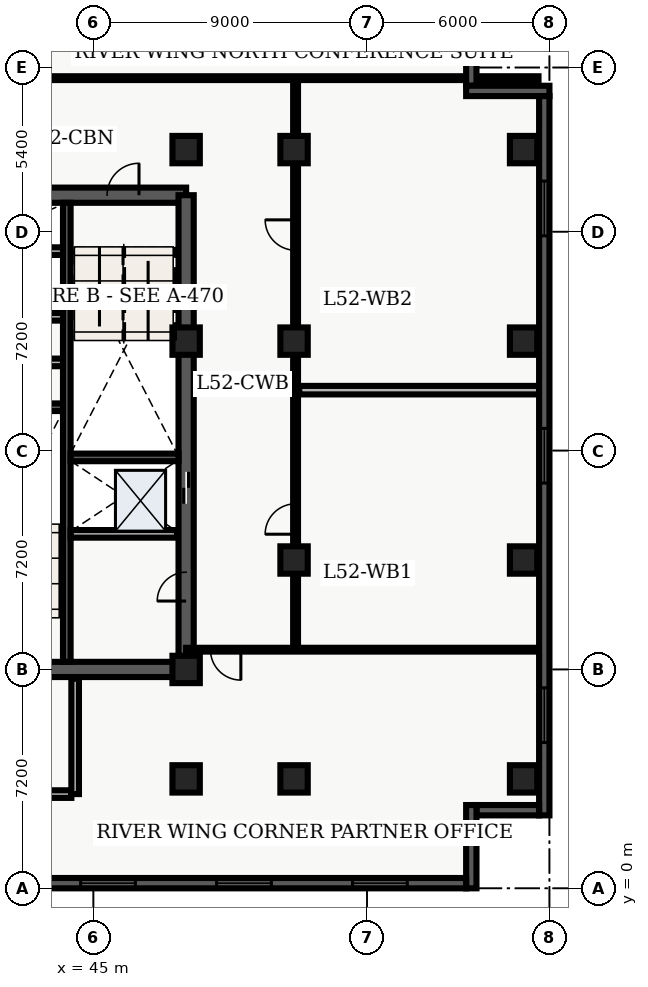
"""IFC4 building model, lengths in metres.
Left out: names, types, materials, properties, quantities, classifications, styles, units other than length and angle.
Written with IfcOpenShell. Run it as: python <this file> out.ifc"""

import sys

from ifc_helpers import new_model, entity, si_unit, converted_unit, direction, frame, origin_with_axes, origin_2d_with_axis, place, context, subcontext, project, spatial, polyline, rectangle, outline, extrude, element, fill, save


model = new_model("IFC4")
c1 = context("Model", 3, precision=1e-05, world=origin_with_axes(), true_north=direction((0.0, 1.0)))
c2 = subcontext(c1, "Body", "Model", "MODEL_VIEW")
j1 = project(units=[si_unit("LENGTHUNIT", "METRE"), converted_unit("PLANEANGLEUNIT", "DEGREE", entity("IfcPlaneAngleMeasure", 0.017), si_unit("PLANEANGLEUNIT", "RADIAN"), dimensions=[0, 0, 0, 0, 0, 0, 0])], contexts=[c1])
p1 = place(None, origin_with_axes())
s1 = spatial("IfcSite", under=j1, at=p1, CompositionType="ELEMENT")
p2 = place(p1, origin_with_axes())
s2 = spatial("IfcBuilding", under=s1, at=p2, CompositionType="ELEMENT")
p3 = place(p2, frame((0.0, 0.0, 212.1), z_axis=(0.0, 0.0, 1.0), x_axis=(1.0, 0.0, 0.0)))
s3 = spatial("IfcBuildingStorey", under=s2, at=p3, CompositionType="ELEMENT", Elevation=212.1)
p4 = place(p3, frame((40.2, 7.2, 0.0), z_axis=(0.0, 0.0, 1.0), x_axis=(1.0, 0.0, 0.0)))
e1 = element("IfcWall", 1, at=p4, inside=s3, PredefinedType="SHEAR", context=c2, shape_type="SweptSolid", body=[
    extrude(outline(polyline([(0.0, -0.25), (7.85, -0.25), (7.85, 0.25), (0.0, 0.25), (0.0, -0.25)])), origin_with_axes(), (0.0, 0.0, 1.0), 3.66),
])
p5 = place(p4, frame((2.175, 0.0, 0.0), z_axis=(0.0, 0.0, 1.0), x_axis=(1.0, 0.0, 0.0)))
e2 = element("IfcOpeningElement", 2, at=p5, cuts=e1, PredefinedType="OPENING", context=c2, shape_type="SweptSolid", body=[
    extrude(rectangle(XDim=1.05, YDim=0.52, at=origin_2d_with_axis()), origin_with_axes(), (0.0, 0.0, 1.0), 2.15),
])
p6 = place(p3, frame((40.2, 22.8, 0.0), z_axis=(0.0, 0.0, 1.0), x_axis=(1.0, 0.0, 0.0)))
e3 = element("IfcWall", 3, at=p6, inside=s3, PredefinedType="SHEAR", context=c2, shape_type="SweptSolid", body=[
    extrude(outline(polyline([(0.0, -0.25), (7.85, -0.25), (7.85, 0.25), (0.0, 0.25), (0.0, -0.25)])), origin_with_axes(), (0.0, 0.0, 1.0), 3.66),
])
p7 = place(p6, frame((5.775, 0.0, 0.0), z_axis=(0.0, 0.0, 1.0), x_axis=(1.0, 0.0, 0.0)))
e4 = element("IfcOpeningElement", 4, at=p7, cuts=e3, PredefinedType="OPENING", context=c2, shape_type="SweptSolid", body=[
    extrude(rectangle(XDim=1.05, YDim=0.52, at=origin_2d_with_axis()), origin_with_axes(), (0.0, 0.0, 1.0), 2.15),
])
p8 = place(p3, frame((48.05, 7.2, 0.0), z_axis=(0.0, 0.0, 1.0), x_axis=(0.0, 1.0, 0.0)))
e5 = element("IfcWall", 5, at=p8, inside=s3, PredefinedType="SHEAR", context=c2, shape_type="SweptSolid", body=[
    extrude(outline(polyline([(0.0, -0.25), (15.6, -0.25), (15.6, 0.25), (0.0, 0.25), (0.0, -0.25)])), origin_with_axes(), (0.0, 0.0, 1.0), 3.66),
])
p9 = place(p8, frame((5.975, 0.0, 0.0), z_axis=(0.0, 0.0, 1.0), x_axis=(1.0, 0.0, 0.0)))
e6 = element("IfcOpeningElement", 6, at=p9, cuts=e5, PredefinedType="OPENING", context=c2, shape_type="SweptSolid", body=[
    extrude(rectangle(XDim=1.05, YDim=0.52, at=origin_2d_with_axis()), origin_with_axes(), (0.0, 0.0, 1.0), 2.15),
])
p10 = place(p8, frame((2.725, 0.0, 0.0), z_axis=(0.0, 0.0, 1.0), x_axis=(1.0, 0.0, 0.0)))
e7 = element("IfcOpeningElement", 7, at=p10, cuts=e5, PredefinedType="OPENING", context=c2, shape_type="SweptSolid", body=[
    extrude(rectangle(XDim=0.95, YDim=0.52, at=origin_2d_with_axis()), origin_with_axes(), (0.0, 0.0, 1.0), 2.15),
])
p11 = place(p3, frame((44.125, 7.45, 0.0), z_axis=(0.0, 0.0, 1.0), x_axis=(0.0, 1.0, 0.0)))
e8 = element("IfcWall", 8, at=p11, inside=s3, PredefinedType="SHEAR", context=c2, shape_type="SweptSolid", body=[
    extrude(outline(polyline([(0.0, -0.125), (15.1, -0.125), (15.1, 0.125), (0.0, 0.125), (0.0, -0.125)])), origin_with_axes(), (0.0, 0.0, 1.0), 3.66),
])
for number, where, z_axis, x_axis in (
    (9, (40.45, 15.825, 0.0), (0.0, 0.0, 1.0), (1.0, 0.0, 0.0)),
    (10, (44.25, 14.175, 0.0), (0.0, 0.0, 1.0), (1.0, 0.0, 0.0)),
):
    element("IfcWall", number, at=place(p3, frame(where, z_axis=z_axis, x_axis=x_axis)), inside=s3, PredefinedType="SHEAR", context=c2, shape_type="SweptSolid", body=[
        extrude(outline(polyline([(0.0, -0.125), (3.55, -0.125), (3.55, 0.125), (0.0, 0.125), (0.0, -0.125)])), origin_with_axes(), (0.0, 0.0, 1.0), 3.66),
    ])
p12 = place(p3, frame((40.5, 17.3, 0.0), z_axis=(0.0, 0.0, 1.0), x_axis=(1.0, 0.0, 0.0)))
e11 = element("IfcWall", 11, at=p12, inside=s3, PredefinedType="SOLIDWALL", context=c2, shape_type="SweptSolid", body=[
    extrude(outline(polyline([(0.0, -0.125), (3.5, -0.125), (3.5, 0.125), (0.0, 0.125), (0.0, -0.125)])), origin_with_axes(), (0.0, 0.0, 1.0), 2.7),
])
p13 = place(p12, frame((2.4, 0.0, 0.0), z_axis=(0.0, 0.0, 1.0), x_axis=(1.0, 0.0, 0.0)))
e12 = element("IfcOpeningElement", 12, at=p13, cuts=e11, PredefinedType="OPENING", context=c2, shape_type="SweptSolid", body=[
    extrude(rectangle(XDim=0.9, YDim=0.27, at=origin_2d_with_axis()), origin_with_axes(), (0.0, 0.0, 1.0), 2.15),
])
p14 = place(p3, frame((40.5, 18.8, 0.0), z_axis=(0.0, 0.0, 1.0), x_axis=(1.0, 0.0, 0.0)))
e13 = element("IfcWall", 13, at=p14, inside=s3, PredefinedType="SOLIDWALL", context=c2, shape_type="SweptSolid", body=[
    extrude(outline(polyline([(0.0, -0.125), (3.5, -0.125), (3.5, 0.125), (0.0, 0.125), (0.0, -0.125)])), origin_with_axes(), (0.0, 0.0, 1.0), 2.7),
])
p15 = place(p3, frame((40.325, 3.1, 0.0), z_axis=(0.0, 0.0, 1.0), x_axis=(1.0, 0.0, 0.0)))
e14 = element("IfcWall", 14, at=p15, inside=s3, PredefinedType="SOLIDWALL", context=c2, shape_type="SweptSolid", body=[
    extrude(outline(polyline([(0.0, -0.125), (3.95, -0.125), (3.95, 0.125), (0.0, 0.125), (0.0, -0.125)])), origin_with_axes(), (0.0, 0.0, 1.0), 2.7),
])
p16 = place(p3, frame((44.4, 3.1, 0.0), z_axis=(0.0, 0.0, 1.0), x_axis=(0.0, 1.0, 0.0)))
e15 = element("IfcWall", 15, at=p16, inside=s3, PredefinedType="SOLIDWALL", context=c2, shape_type="SweptSolid", body=[
    extrude(outline(polyline([(0.0, -0.125), (3.8, -0.125), (3.8, 0.125), (0.0, 0.125), (0.0, -0.125)])), origin_with_axes(), (0.0, 0.0, 1.0), 2.7),
])
for number, where, z_axis, x_axis in (
    (16, (48.05, 3.6, 0.0), (0.0, 0.0, 1.0), (1.0, 0.0, 0.0)),
    (17, (48.05, 7.2, 0.0), (0.0, 0.0, 1.0), (1.0, 0.0, 0.0)),
    (18, (48.05, 18.0, 0.0), (0.0, 0.0, 1.0), (1.0, 0.0, 0.0)),
    (19, (48.05, 24.3, 0.0), (0.0, 0.0, 1.0), (1.0, 0.0, 0.0)),
    (20, (51.6, 3.6, 0.0), (0.0, 0.0, 1.0), (1.0, 0.0, 0.0)),
    (21, (51.6, 10.8, 0.0), (0.0, 0.0, 1.0), (1.0, 0.0, 0.0)),
    (22, (51.6, 18.0, 0.0), (0.0, 0.0, 1.0), (1.0, 0.0, 0.0)),
    (23, (51.6, 24.3, 0.0), (0.0, 0.0, 1.0), (1.0, 0.0, 0.0)),
    (24, (59.15, 3.6, 0.0), (0.0, 0.0, 1.0), (1.0, 0.0, 0.0)),
    (25, (59.15, 10.8, 0.0), (0.0, 0.0, 1.0), (1.0, 0.0, 0.0)),
    (26, (59.15, 18.0, 0.0), (0.0, 0.0, 1.0), (1.0, 0.0, 0.0)),
    (27, (59.15, 24.3, 0.0), (0.0, 0.0, 1.0), (1.0, 0.0, 0.0)),
):
    element("IfcColumn", number, at=place(p3, frame(where, z_axis=z_axis, x_axis=x_axis)), inside=s3, PredefinedType="COLUMN", context=c2, shape_type="SweptSolid", body=[
        extrude(rectangle(XDim=0.9, YDim=0.9, at=origin_2d_with_axis()), origin_with_axes(), (0.0, 0.0, 1.0), 3.9),
    ])
for number, where, z_axis, x_axis in (
    (28, (40.5, 20.96, 0.0), (0.0, 0.0, 1.0), (1.0, 0.0, 0.0)),
    (29, (44.25, 11.66, 0.0), (0.0, 0.0, 1.0), (1.0, 0.0, 0.0)),
):
    element("IfcWall", number, at=place(p3, frame(where, z_axis=z_axis, x_axis=x_axis)), inside=s3, PredefinedType="SOLIDWALL", context=c2, shape_type="SweptSolid", body=[
        extrude(outline(polyline([(0.0, -0.125), (3.5, -0.125), (3.5, 0.125), (0.0, 0.125), (0.0, -0.125)])), origin_with_axes(), (0.0, 0.0, 1.0), 2.7),
    ])
p17 = place(p3, frame((51.65, 7.85, 0.0), z_axis=(0.0, 0.0, 1.0), x_axis=(0.0, 1.0, 0.0)))
e30 = element("IfcWall", 30, at=p17, inside=s3, PredefinedType="PARTITIONING", context=c2, shape_type="SweptSolid", body=[
    extrude(outline(polyline([(0.0, -0.08), (18.8, -0.08), (18.8, 0.08), (0.0, 0.08), (0.0, -0.08)])), origin_with_axes(), (0.0, 0.0, 1.0), 2.7),
])
p18 = place(p17, frame((4.298, 0.0, 0.0), z_axis=(0.0, 0.0, 1.0), x_axis=(1.0, 0.0, 0.0)))
e31 = element("IfcOpeningElement", 31, at=p18, cuts=e30, PredefinedType="OPENING", context=c2, shape_type="SweptSolid", body=[
    extrude(rectangle(XDim=1.0, YDim=0.18, at=origin_2d_with_axis()), origin_with_axes(), (0.0, 0.0, 1.0), 2.15),
])
p19 = place(p17, frame((13.639, 0.0, 0.0), z_axis=(0.0, 0.0, 1.0), x_axis=(1.0, 0.0, 0.0)))
e32 = element("IfcOpeningElement", 32, at=p19, cuts=e30, PredefinedType="OPENING", context=c2, shape_type="SweptSolid", body=[
    extrude(rectangle(XDim=1.0, YDim=0.18, at=origin_2d_with_axis()), origin_with_axes(), (0.0, 0.0, 1.0), 2.15),
])
p20 = place(p3, frame((59.665, 7.85, 0.0), z_axis=(0.0, 0.0, 1.0), x_axis=(-1.0, 0.0, 0.0)))
e33 = element("IfcWall", 33, at=p20, inside=s3, PredefinedType="PARTITIONING", context=c2, shape_type="SweptSolid", body=[
    extrude(outline(polyline([(0.0, -0.062), (11.615, -0.062), (11.615, 0.062), (0.0, 0.062), (0.0, -0.062)])), origin_with_axes(), (0.0, 0.0, 1.0), 2.7),
])
p21 = place(p20, frame((10.315, 0.0, 0.0), z_axis=(0.0, 0.0, 1.0), x_axis=(1.0, 0.0, 0.0)))
e34 = element("IfcOpeningElement", 34, at=p21, cuts=e33, PredefinedType="OPENING", context=c2, shape_type="SweptSolid", body=[
    extrude(rectangle(XDim=1.0, YDim=0.145, at=origin_2d_with_axis()), origin_with_axes(), (0.0, 0.0, 1.0), 2.15),
])
p22 = place(p3, frame((38.735, 26.65, 0.0), z_axis=(0.0, 0.0, 1.0), x_axis=(1.0, 0.0, 0.0)))
e35 = element("IfcWall", 35, at=p22, inside=s3, PredefinedType="PARTITIONING", context=c2, shape_type="SweptSolid", body=[
    extrude(outline(polyline([(0.0, -0.062), (20.905, -0.062), (20.905, 0.062), (0.0, 0.062), (0.0, -0.062)])), origin_with_axes(), (0.0, 0.0, 1.0), 2.7),
])
p23 = place(p22, frame((4.265, 0.0, 0.0), z_axis=(0.0, 0.0, 1.0), x_axis=(1.0, 0.0, 0.0)))
e36 = element("IfcOpeningElement", 36, at=p23, cuts=e35, PredefinedType="OPENING", context=c2, shape_type="SweptSolid", body=[
    extrude(rectangle(XDim=1.0, YDim=0.145, at=origin_2d_with_axis()), origin_with_axes(), (0.0, 0.0, 1.0), 2.15),
])
p24 = place(p3, frame((51.77, 16.387, 0.0), z_axis=(0.0, 0.0, 1.0), x_axis=(1.0, 0.0, 0.0)))
e37 = element("IfcWall", 37, at=p24, inside=s3, PredefinedType="PARTITIONING", context=c2, shape_type="SweptSolid", body=[
    extrude(outline(polyline([(0.0, -0.14), (7.895, -0.14), (7.895, 0.14), (0.0, 0.14), (0.0, -0.14)])), origin_with_axes(), (0.0, 0.0, 1.0), 2.7),
])
p25 = place(p3, frame((57.43, 28.46, 0.0), z_axis=(0.0, 0.0, 1.0), x_axis=(0.0, -1.0, 0.0)))
e38 = element("IfcWall", 38, at=p25, inside=s3, PredefinedType="SOLIDWALL", context=c2, shape_type="SweptSolid", body=[
    extrude(outline(polyline([(0.0, -0.17), (2.06, -0.17), (2.06, 0.17), (0.0, 0.17), (0.0, -0.17)])), origin_with_axes(), (0.0, 0.0, 1.0), 3.66),
])
p26 = place(p3, frame((57.26, 26.23, 0.0), z_axis=(0.0, 0.0, 1.0), x_axis=(1.0, 0.0, 0.0)))
e39 = element("IfcWall", 39, at=p26, inside=s3, PredefinedType="SOLIDWALL", context=c2, shape_type="SweptSolid", body=[
    extrude(outline(polyline([(0.0, -0.17), (2.74, -0.17), (2.74, 0.17), (0.0, 0.17), (0.0, -0.17)])), origin_with_axes(), (0.0, 0.0, 1.0), 3.66),
])
p27 = place(p3, frame((59.83, 26.06, 0.0), z_axis=(0.0, 0.0, 1.0), x_axis=(0.0, -1.0, 0.0)))
e40 = element("IfcWall", 40, at=p27, inside=s3, PredefinedType="SOLIDWALL", context=c2, shape_type="SweptSolid", body=[
    extrude(outline(polyline([(0.0, -0.17), (23.66, -0.17), (23.66, 0.17), (0.0, 0.17), (0.0, -0.17)])), origin_with_axes(), (0.0, 0.0, 1.0), 3.66),
])
p28 = place(p27, frame((3.696, 0.0, 0.45), z_axis=(0.0, 0.0, 1.0), x_axis=(1.0, 0.0, 0.0)))
e41 = element("IfcOpeningElement", 41, at=p28, cuts=e40, PredefinedType="OPENING", context=c2, shape_type="SweptSolid", body=[
    extrude(rectangle(XDim=1.8, YDim=0.36, at=origin_2d_with_axis()), origin_with_axes(), (0.0, 0.0, 1.0), 2.1),
])
p29 = place(p27, frame((11.83, 0.0, 0.45), z_axis=(0.0, 0.0, 1.0), x_axis=(1.0, 0.0, 0.0)))
e42 = element("IfcOpeningElement", 42, at=p29, cuts=e40, PredefinedType="OPENING", context=c2, shape_type="SweptSolid", body=[
    extrude(rectangle(XDim=1.8, YDim=0.36, at=origin_2d_with_axis()), origin_with_axes(), (0.0, 0.0, 1.0), 2.1),
])
p30 = place(p27, frame((20.364, 0.0, 0.45), z_axis=(0.0, 0.0, 1.0), x_axis=(1.0, 0.0, 0.0)))
e43 = element("IfcOpeningElement", 43, at=p30, cuts=e40, PredefinedType="OPENING", context=c2, shape_type="SweptSolid", body=[
    extrude(rectangle(XDim=1.8, YDim=0.36, at=origin_2d_with_axis()), origin_with_axes(), (0.0, 0.0, 1.0), 2.1),
])
p31 = place(p3, frame((59.66, 2.57, 0.0), z_axis=(0.0, 0.0, 1.0), x_axis=(-1.0, 0.0, 0.0)))
e44 = element("IfcWall", 44, at=p31, inside=s3, PredefinedType="SOLIDWALL", context=c2, shape_type="SweptSolid", body=[
    extrude(outline(polyline([(0.0, -0.17), (2.06, -0.17), (2.06, 0.17), (0.0, 0.17), (0.0, -0.17)])), origin_with_axes(), (0.0, 0.0, 1.0), 3.66),
])
p32 = place(p3, frame((57.43, 2.74, 0.0), z_axis=(0.0, 0.0, 1.0), x_axis=(0.0, -1.0, 0.0)))
e45 = element("IfcWall", 45, at=p32, inside=s3, PredefinedType="SOLIDWALL", context=c2, shape_type="SweptSolid", body=[
    extrude(outline(polyline([(0.0, -0.17), (2.74, -0.17), (2.74, 0.17), (0.0, 0.17), (0.0, -0.17)])), origin_with_axes(), (0.0, 0.0, 1.0), 3.66),
])
p33 = place(p3, frame((57.26, 0.17, 0.0), z_axis=(0.0, 0.0, 1.0), x_axis=(-1.0, 0.0, 0.0)))
e46 = element("IfcWall", 46, at=p33, inside=s3, PredefinedType="SOLIDWALL", context=c2, shape_type="SweptSolid", body=[
    extrude(outline(polyline([(0.0, -0.17), (54.86, -0.17), (54.86, 0.17), (0.0, 0.17), (0.0, -0.17)])), origin_with_axes(), (0.0, 0.0, 1.0), 3.66),
])
p34 = place(p33, frame((2.836, 0.0, 0.45), z_axis=(0.0, 0.0, 1.0), x_axis=(1.0, 0.0, 0.0)))
e47 = element("IfcOpeningElement", 47, at=p34, cuts=e46, PredefinedType="OPENING", context=c2, shape_type="SweptSolid", body=[
    extrude(rectangle(XDim=1.8, YDim=0.36, at=origin_2d_with_axis()), origin_with_axes(), (0.0, 0.0, 1.0), 2.1),
])
p35 = place(p33, frame((7.307, 0.0, 0.45), z_axis=(0.0, 0.0, 1.0), x_axis=(1.0, 0.0, 0.0)))
e48 = element("IfcOpeningElement", 48, at=p35, cuts=e46, PredefinedType="OPENING", context=c2, shape_type="SweptSolid", body=[
    extrude(rectangle(XDim=1.8, YDim=0.36, at=origin_2d_with_axis()), origin_with_axes(), (0.0, 0.0, 1.0), 2.1),
])
p36 = place(p33, frame((11.779, 0.0, 0.45), z_axis=(0.0, 0.0, 1.0), x_axis=(1.0, 0.0, 0.0)))
e49 = element("IfcOpeningElement", 49, at=p36, cuts=e46, PredefinedType="OPENING", context=c2, shape_type="SweptSolid", body=[
    extrude(rectangle(XDim=1.8, YDim=0.36, at=origin_2d_with_axis()), origin_with_axes(), (0.0, 0.0, 1.0), 2.1),
])
p37 = place(p33, frame((16.251, 0.0, 0.45), z_axis=(0.0, 0.0, 1.0), x_axis=(1.0, 0.0, 0.0)))
e50 = element("IfcOpeningElement", 50, at=p37, cuts=e46, PredefinedType="OPENING", context=c2, shape_type="SweptSolid", body=[
    extrude(rectangle(XDim=1.8, YDim=0.36, at=origin_2d_with_axis()), origin_with_axes(), (0.0, 0.0, 1.0), 2.1),
])
p38 = place(p33, frame((20.723, 0.0, 0.45), z_axis=(0.0, 0.0, 1.0), x_axis=(1.0, 0.0, 0.0)))
e51 = element("IfcOpeningElement", 51, at=p38, cuts=e46, PredefinedType="OPENING", context=c2, shape_type="SweptSolid", body=[
    extrude(rectangle(XDim=1.8, YDim=0.36, at=origin_2d_with_axis()), origin_with_axes(), (0.0, 0.0, 1.0), 2.1),
])
p39 = place(p33, frame((25.194, 0.0, 0.45), z_axis=(0.0, 0.0, 1.0), x_axis=(1.0, 0.0, 0.0)))
e52 = element("IfcOpeningElement", 52, at=p39, cuts=e46, PredefinedType="OPENING", context=c2, shape_type="SweptSolid", body=[
    extrude(rectangle(XDim=1.8, YDim=0.36, at=origin_2d_with_axis()), origin_with_axes(), (0.0, 0.0, 1.0), 2.1),
])
p40 = place(p33, frame((29.666, 0.0, 0.45), z_axis=(0.0, 0.0, 1.0), x_axis=(1.0, 0.0, 0.0)))
e53 = element("IfcOpeningElement", 53, at=p40, cuts=e46, PredefinedType="OPENING", context=c2, shape_type="SweptSolid", body=[
    extrude(rectangle(XDim=1.8, YDim=0.36, at=origin_2d_with_axis()), origin_with_axes(), (0.0, 0.0, 1.0), 2.1),
])
p41 = place(p33, frame((34.138, 0.0, 0.45), z_axis=(0.0, 0.0, 1.0), x_axis=(1.0, 0.0, 0.0)))
e54 = element("IfcOpeningElement", 54, at=p41, cuts=e46, PredefinedType="OPENING", context=c2, shape_type="SweptSolid", body=[
    extrude(rectangle(XDim=1.8, YDim=0.36, at=origin_2d_with_axis()), origin_with_axes(), (0.0, 0.0, 1.0), 2.1),
])
p42 = place(p33, frame((38.609, 0.0, 0.45), z_axis=(0.0, 0.0, 1.0), x_axis=(1.0, 0.0, 0.0)))
e55 = element("IfcOpeningElement", 55, at=p42, cuts=e46, PredefinedType="OPENING", context=c2, shape_type="SweptSolid", body=[
    extrude(rectangle(XDim=1.8, YDim=0.36, at=origin_2d_with_axis()), origin_with_axes(), (0.0, 0.0, 1.0), 2.1),
])
p43 = place(p33, frame((43.531, 0.0, 0.45), z_axis=(0.0, 0.0, 1.0), x_axis=(1.0, 0.0, 0.0)))
e56 = element("IfcOpeningElement", 56, at=p43, cuts=e46, PredefinedType="OPENING", context=c2, shape_type="SweptSolid", body=[
    extrude(rectangle(XDim=1.8, YDim=0.36, at=origin_2d_with_axis()), origin_with_axes(), (0.0, 0.0, 1.0), 2.1),
])
p44 = place(p33, frame((47.553, 0.0, 0.45), z_axis=(0.0, 0.0, 1.0), x_axis=(1.0, 0.0, 0.0)))
e57 = element("IfcOpeningElement", 57, at=p44, cuts=e46, PredefinedType="OPENING", context=c2, shape_type="SweptSolid", body=[
    extrude(rectangle(XDim=1.8, YDim=0.36, at=origin_2d_with_axis()), origin_with_axes(), (0.0, 0.0, 1.0), 2.1),
])
p45 = place(p33, frame((52.474, 0.0, 0.45), z_axis=(0.0, 0.0, 1.0), x_axis=(1.0, 0.0, 0.0)))
e58 = element("IfcOpeningElement", 58, at=p45, cuts=e46, PredefinedType="OPENING", context=c2, shape_type="SweptSolid", body=[
    extrude(rectangle(XDim=1.8, YDim=0.36, at=origin_2d_with_axis()), origin_with_axes(), (0.0, 0.0, 1.0), 2.1),
])
p46 = place(p8, frame((5.975, 0.0, 0.0), z_axis=(0.0, 0.0, 1.0), x_axis=(1.0, 0.0, 0.0)))
e59 = element("IfcDoor", 59, at=p46, inside=s3, OperationType="SLIDING_TO_LEFT", PredefinedType="DOOR", context=c2, shape_type="SweptSolid", body=[
    extrude(rectangle(XDim=1.05, YDim=0.09, at=origin_2d_with_axis()), origin_with_axes(), (0.0, 0.0, 1.0), 2.15),
])
fill(e6, e59)
p47 = place(p6, frame((5.775, 0.0, 0.0), z_axis=(0.0, 0.0, 1.0), x_axis=(1.0, 0.0, 0.0)))
e60 = element("IfcDoor", 60, at=p47, inside=s3, OperationType="SINGLE_SWING_RIGHT", PredefinedType="DOOR", context=c2, shape_type="SweptSolid", body=[
    extrude(rectangle(XDim=1.05, YDim=0.09, at=origin_2d_with_axis()), origin_with_axes(), (0.0, 0.0, 1.0), 2.15),
])
fill(e4, e60)
p48 = place(p8, frame((2.725, 0.0, 0.0), z_axis=(0.0, 0.0, 1.0), x_axis=(1.0, 0.0, 0.0)))
e61 = element("IfcDoor", 61, at=p48, inside=s3, OperationType="SINGLE_SWING_LEFT", PredefinedType="DOOR", context=c2, shape_type="SweptSolid", body=[
    extrude(rectangle(XDim=0.95, YDim=0.09, at=origin_2d_with_axis()), origin_with_axes(), (0.0, 0.0, 1.0), 2.15),
])
fill(e7, e61)
p49 = place(p20, frame((10.315, 0.0, 0.0), z_axis=(0.0, 0.0, 1.0), x_axis=(1.0, 0.0, 0.0)))
e62 = element("IfcDoor", 62, at=p49, inside=s3, OperationType="SINGLE_SWING_LEFT", PredefinedType="DOOR", context=c2, shape_type="SweptSolid", body=[
    extrude(rectangle(XDim=1.0, YDim=0.075, at=origin_2d_with_axis()), origin_with_axes(), (0.0, 0.0, 1.0), 2.15),
])
fill(e34, e62)
p50 = place(p17, frame((4.298, 0.0, 0.0), z_axis=(0.0, 0.0, 1.0), x_axis=(1.0, 0.0, 0.0)))
e63 = element("IfcDoor", 63, at=p50, inside=s3, OperationType="SINGLE_SWING_LEFT", PredefinedType="DOOR", context=c2, shape_type="SweptSolid", body=[
    extrude(rectangle(XDim=1.0, YDim=0.09, at=origin_2d_with_axis()), origin_with_axes(), (0.0, 0.0, 1.0), 2.15),
])
fill(e31, e63)
p51 = place(p17, frame((13.639, 0.0, 0.0), z_axis=(0.0, 0.0, 1.0), x_axis=(1.0, 0.0, 0.0)))
e64 = element("IfcDoor", 64, at=p51, inside=s3, OperationType="SINGLE_SWING_RIGHT", PredefinedType="DOOR", context=c2, shape_type="SweptSolid", body=[
    extrude(rectangle(XDim=1.0, YDim=0.09, at=origin_2d_with_axis()), origin_with_axes(), (0.0, 0.0, 1.0), 2.15),
])
fill(e32, e64)
p52 = place(p27, frame((3.696, 0.0, 0.45), z_axis=(0.0, 0.0, 1.0), x_axis=(1.0, 0.0, 0.0)))
e65 = element("IfcWindow", 65, at=p52, inside=s3, PredefinedType="WINDOW", context=c2, shape_type="SweptSolid", body=[
    extrude(rectangle(XDim=1.8, YDim=0.09, at=origin_2d_with_axis()), origin_with_axes(), (0.0, 0.0, 1.0), 2.1),
])
fill(e41, e65)
p53 = place(p27, frame((11.83, 0.0, 0.45), z_axis=(0.0, 0.0, 1.0), x_axis=(1.0, 0.0, 0.0)))
e66 = element("IfcWindow", 66, at=p53, inside=s3, PredefinedType="WINDOW", context=c2, shape_type="SweptSolid", body=[
    extrude(rectangle(XDim=1.8, YDim=0.09, at=origin_2d_with_axis()), origin_with_axes(), (0.0, 0.0, 1.0), 2.1),
])
fill(e42, e66)
p54 = place(p27, frame((20.364, 0.0, 0.45), z_axis=(0.0, 0.0, 1.0), x_axis=(1.0, 0.0, 0.0)))
e67 = element("IfcWindow", 67, at=p54, inside=s3, PredefinedType="WINDOW", context=c2, shape_type="SweptSolid", body=[
    extrude(rectangle(XDim=1.8, YDim=0.09, at=origin_2d_with_axis()), origin_with_axes(), (0.0, 0.0, 1.0), 2.1),
])
fill(e43, e67)
p55 = place(p33, frame((2.836, 0.0, 0.45), z_axis=(0.0, 0.0, 1.0), x_axis=(1.0, 0.0, 0.0)))
e68 = element("IfcWindow", 68, at=p55, inside=s3, PredefinedType="WINDOW", context=c2, shape_type="SweptSolid", body=[
    extrude(rectangle(XDim=1.8, YDim=0.09, at=origin_2d_with_axis()), origin_with_axes(), (0.0, 0.0, 1.0), 2.1),
])
fill(e47, e68)
p56 = place(p33, frame((7.307, 0.0, 0.45), z_axis=(0.0, 0.0, 1.0), x_axis=(1.0, 0.0, 0.0)))
e69 = element("IfcWindow", 69, at=p56, inside=s3, PredefinedType="WINDOW", context=c2, shape_type="SweptSolid", body=[
    extrude(rectangle(XDim=1.8, YDim=0.09, at=origin_2d_with_axis()), origin_with_axes(), (0.0, 0.0, 1.0), 2.1),
])
fill(e48, e69)
p57 = place(p33, frame((11.779, 0.0, 0.45), z_axis=(0.0, 0.0, 1.0), x_axis=(1.0, 0.0, 0.0)))
e70 = element("IfcWindow", 70, at=p57, inside=s3, PredefinedType="WINDOW", context=c2, shape_type="SweptSolid", body=[
    extrude(rectangle(XDim=1.8, YDim=0.09, at=origin_2d_with_axis()), origin_with_axes(), (0.0, 0.0, 1.0), 2.1),
])
fill(e49, e70)
save(model, sys.argv[1])
